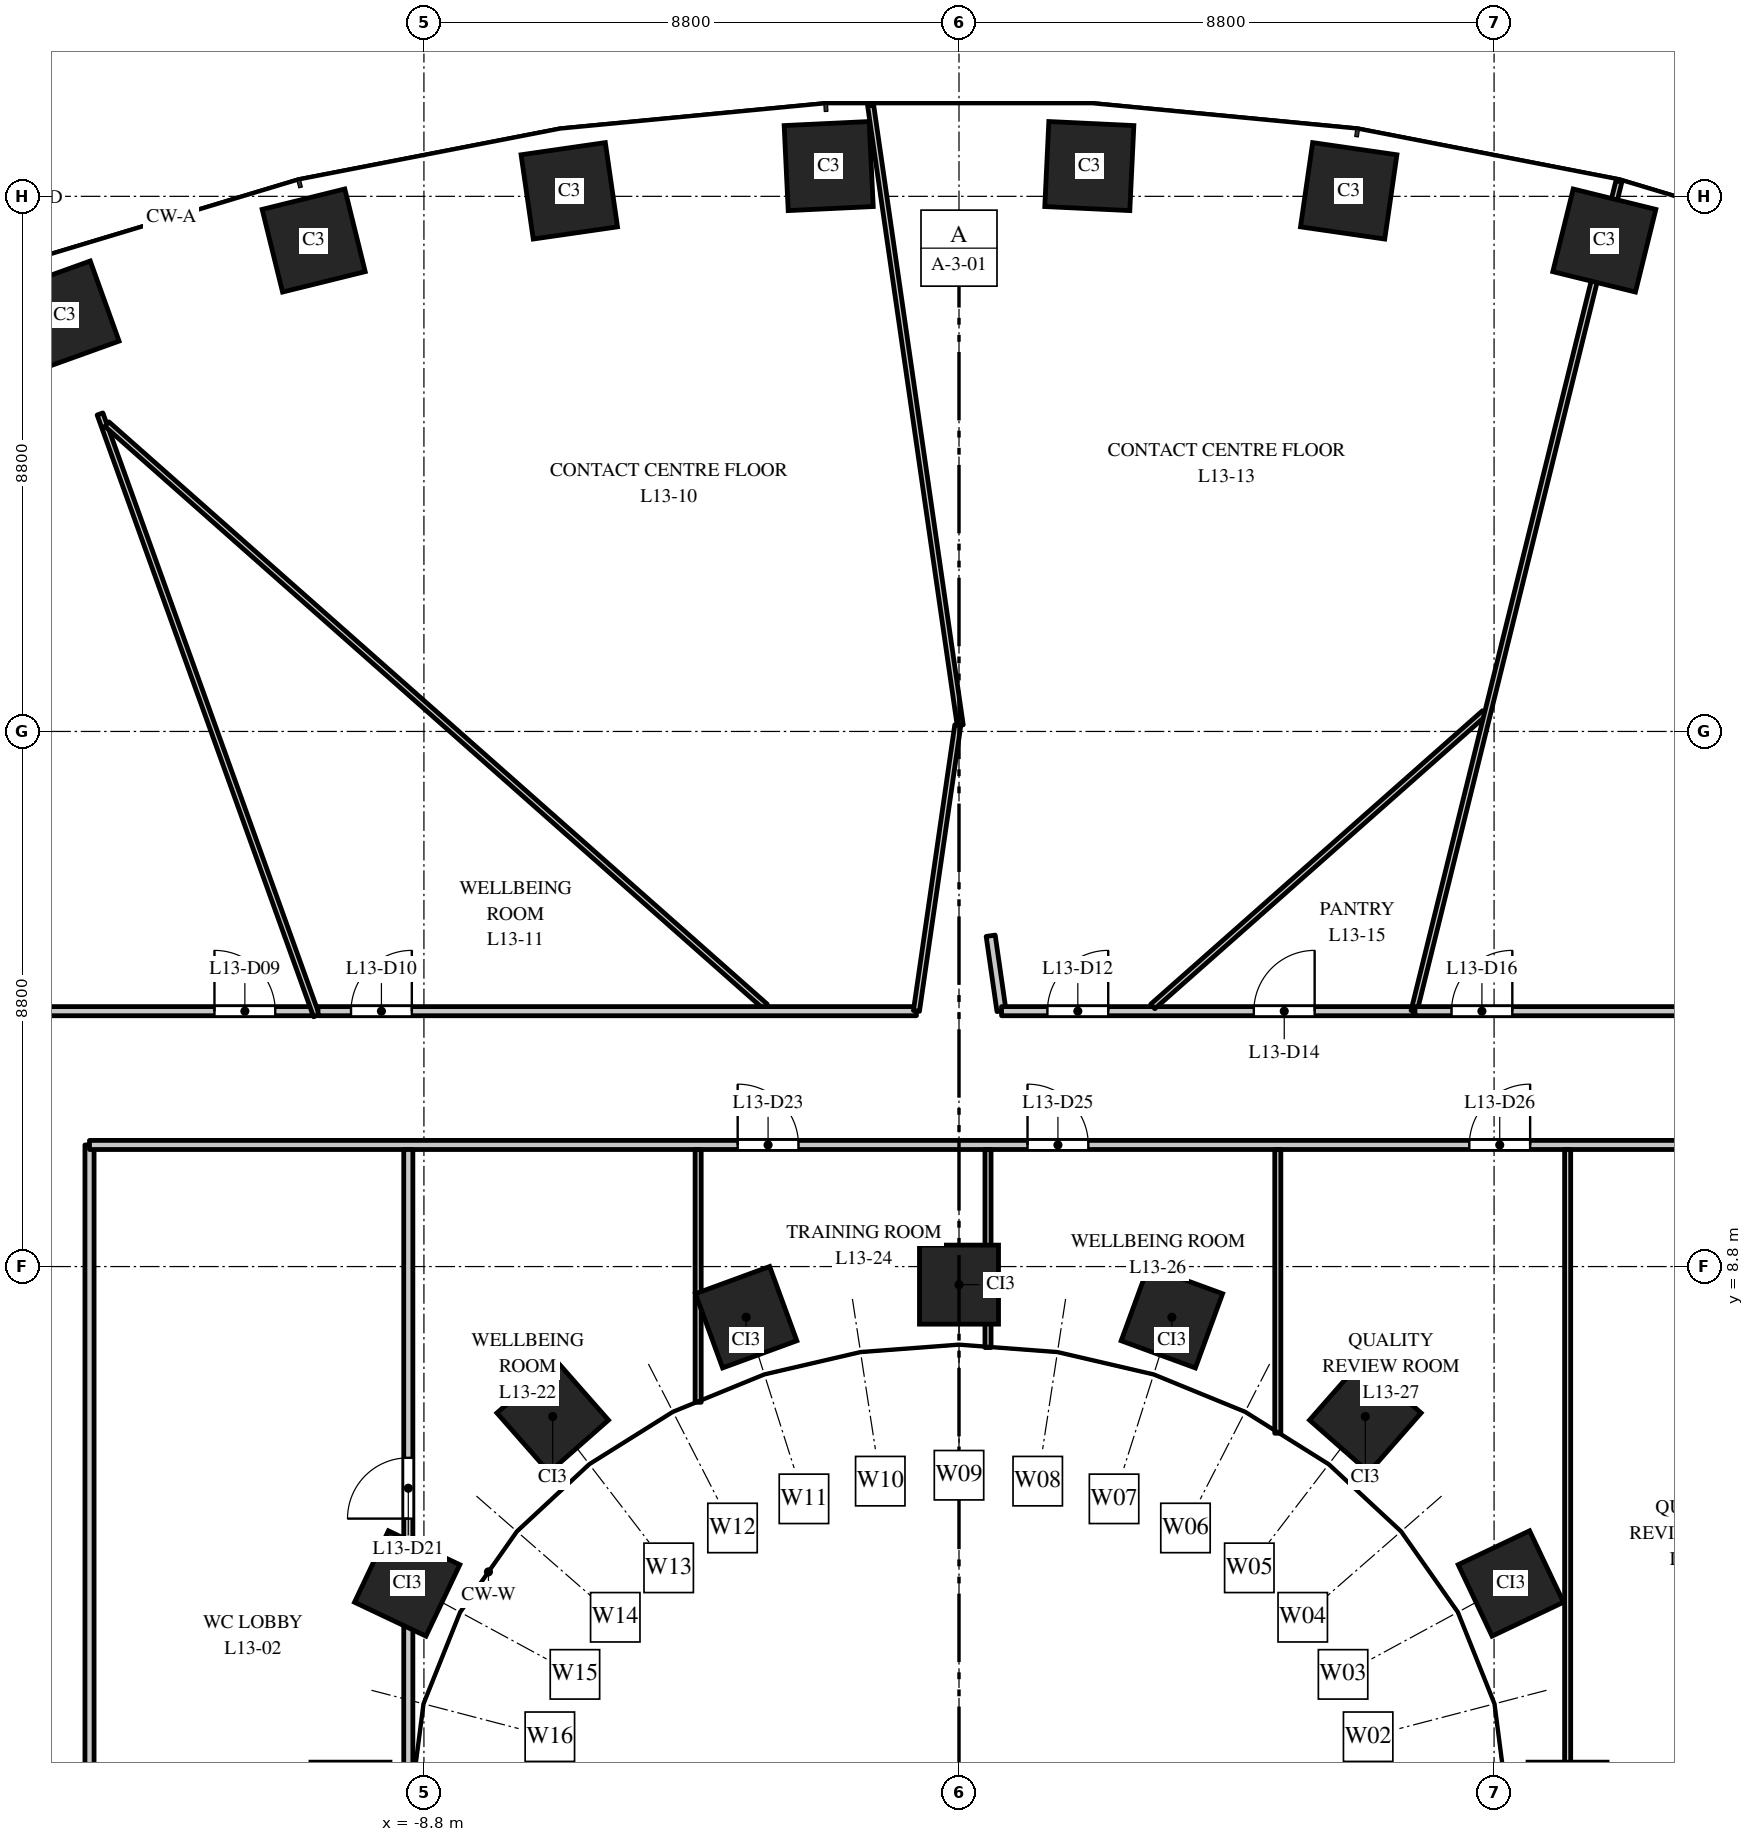
"""IFC4 building model, lengths in metres.
Left out: names, types, materials, properties, quantities, classifications, styles, units other than length and angle.
Written with IfcOpenShell. Run it as: python <this file> out.ifc"""

import sys

from ifc_helpers import new_model, si_unit, direction, frame, frame_2d, origin, origin_2d, place, context, subcontext, project, spatial, rectangle, extrude, element, fill, save


model = new_model("IFC4")
c1 = context("Model", 3, precision=1e-05, world=origin(), true_north=direction((0.0, 1.0)))
c2 = subcontext(c1, "Body", "Model", "MODEL_VIEW")
j1 = project(units=[si_unit("LENGTHUNIT", "METRE"), si_unit("PLANEANGLEUNIT", "RADIAN")], contexts=[c1])
p1 = place(None, origin())
s1 = spatial("IfcSite", under=j1, at=p1, CompositionType="ELEMENT")
p2 = place(p1, origin())
s2 = spatial("IfcBuilding", under=s1, at=p2, CompositionType="ELEMENT")
p3 = place(p2, frame((0.0, 0.0, 62.5)))
s3 = spatial("IfcBuildingStorey", under=s2, at=p3, CompositionType="ELEMENT", Elevation=62.5)
for number, where, z_axis, x_axis in (
    (1, (10.613, 25.674, 0.0), (0.0, 0.0, 1.0), (-0.971, 0.24, 0.0)),
    (2, (6.409, 26.491, 0.0), (0.0, 0.0, 1.0), (-0.99, 0.143, 0.0)),
    (3, (2.143, 26.898, 0.0), (0.0, 0.0, 1.0), (-0.999, 0.048, 0.0)),
    (4, (-2.143, 26.898, 0.0), (0.0, 0.0, 1.0), (-0.999, -0.048, 0.0)),
    (5, (-6.409, 26.491, 0.0), (0.0, 0.0, 1.0), (-0.99, -0.143, 0.0)),
    (6, (-10.613, 25.674, 0.0), (0.0, 0.0, 1.0), (-0.971, -0.24, 0.0)),
    (7, (-14.709, 24.441, 0.0), (0.0, 0.0, 1.0), (-0.941, -0.338, 0.0)),
):
    element("IfcColumn", number, at=place(p3, frame(where, z_axis=z_axis, x_axis=x_axis)), inside=s3, PredefinedType="COLUMN", context=c2, shape_type="SweptSolid", body=[
        extrude(rectangle(XDim=1.4, YDim=1.4, at=origin_2d()), origin(), (0.0, 0.0, 1.0), 4.0),
    ])
for number, where, z_axis, x_axis in (
    (8, (10.008, 0.0, 0.0), (0.0, 0.0, 1.0), (0.0, 1.0, 0.0)),
    (9, (9.076, 3.588, 0.0), (0.0, 0.0, 1.0), (-0.429, 0.903, 0.0)),
    (10, (6.682, 6.334, 0.0), (0.0, 0.0, 1.0), (-0.751, 0.66, 0.0)),
    (11, (3.501, 7.967, 0.0), (0.0, 0.0, 1.0), (-0.939, 0.344, 0.0)),
    (12, (0.0, 8.503, 0.0), (0.0, 0.0, 1.0), (-1.0, 0.0, 0.0)),
    (13, (-3.501, 7.967, 0.0), (0.0, 0.0, 1.0), (-0.939, -0.344, 0.0)),
    (14, (-6.682, 6.334, 0.0), (0.0, 0.0, 1.0), (-0.751, -0.66, 0.0)),
    (15, (-9.076, 3.588, 0.0), (0.0, 0.0, 1.0), (-0.429, -0.903, 0.0)),
    (16, (-10.008, 0.0, 0.0), (0.0, 0.0, 1.0), (0.0, -1.0, 0.0)),
):
    element("IfcColumn", number, at=place(p3, frame(where, z_axis=z_axis, x_axis=x_axis)), inside=s3, PredefinedType="COLUMN", context=c2, shape_type="SweptSolid", body=[
        extrude(rectangle(XDim=1.3, YDim=1.3, at=origin_2d()), origin(), (0.0, 0.0, 1.0), 4.0),
    ])
p4 = place(p3, frame((-16.5, 13.0, 0.0), z_axis=(0.0, 0.0, 1.0), x_axis=(1.0, 0.0, 0.0)))
e17 = element("IfcWall", 17, at=p4, inside=s3, PredefinedType="PARTITIONING", context=c2, shape_type="SweptSolid", body=[
    extrude(rectangle(XDim=5.893, YDim=0.15, at=frame_2d((2.947, 0.0))), origin(), (0.0, 0.0, 1.0), 2.85),
])
p5 = place(p4, frame((4.255, 0.0, 0.0)))
e18 = element("IfcOpeningElement", 18, at=p5, cuts=e17, PredefinedType="OPENING", context=c2, shape_type="SweptSolid", body=[
    extrude(rectangle(XDim=1.0, YDim=2.1, at=frame_2d((0.5, 1.05))), frame((0.0, 0.085, 0.0), z_axis=(0.0, -1.0, 0.0), x_axis=(1.0, 0.0, 0.0)), (0.0, 0.0, 1.0), 0.17),
])
p6 = place(p3, frame((-14.3, -10.8, 0.0), z_axis=(0.0, 0.0, 1.0), x_axis=(0.0, 1.0, 0.0)))
e19 = element("IfcWall", 19, at=p6, inside=s3, PredefinedType="PARTITIONING", context=c2, shape_type="SweptSolid", body=[
    extrude(rectangle(XDim=21.6, YDim=0.15, at=frame_2d((10.8, 0.0))), origin(), (0.0, 0.0, 1.0), 2.75),
])
p7 = place(p6, frame((0.65, 0.0, 0.0)))
e20 = element("IfcOpeningElement", 20, at=p7, cuts=e19, PredefinedType="OPENING", context=c2, shape_type="SweptSolid", body=[
    extrude(rectangle(XDim=1.0, YDim=2.1, at=frame_2d((0.5, 1.05))), frame((0.0, 0.085, 0.0), z_axis=(0.0, -1.0, 0.0), x_axis=(1.0, 0.0, 0.0)), (0.0, 0.0, 1.0), 0.17),
])
p8 = place(p3, frame((-14.3, 10.8, 0.0), z_axis=(0.0, 0.0, 1.0), x_axis=(1.0, 0.0, 0.0)))
e21 = element("IfcWall", 21, at=p8, inside=s3, PredefinedType="PARTITIONING", context=c2, shape_type="SweptSolid", body=[
    extrude(rectangle(XDim=28.6, YDim=0.15, at=frame_2d((14.3, 0.0))), origin(), (0.0, 0.0, 1.0), 2.85),
])
p9 = place(p8, frame((10.66, 0.0, 0.0)))
e22 = element("IfcOpeningElement", 22, at=p9, cuts=e21, PredefinedType="OPENING", context=c2, shape_type="SweptSolid", body=[
    extrude(rectangle(XDim=1.0, YDim=2.1, at=frame_2d((0.5, 1.05))), frame((0.0, 0.085, 0.0), z_axis=(0.0, -1.0, 0.0), x_axis=(1.0, 0.0, 0.0)), (0.0, 0.0, 1.0), 0.17),
])
p10 = place(p8, frame((15.427, 0.0, 0.0)))
e23 = element("IfcOpeningElement", 23, at=p10, cuts=e21, PredefinedType="OPENING", context=c2, shape_type="SweptSolid", body=[
    extrude(rectangle(XDim=1.0, YDim=2.1, at=frame_2d((0.5, 1.05))), frame((0.0, 0.085, 0.0), z_axis=(0.0, -1.0, 0.0), x_axis=(1.0, 0.0, 0.0)), (0.0, 0.0, 1.0), 0.17),
])
p11 = place(p8, frame((22.693, 0.0, 0.0)))
e24 = element("IfcOpeningElement", 24, at=p11, cuts=e21, PredefinedType="OPENING", context=c2, shape_type="SweptSolid", body=[
    extrude(rectangle(XDim=1.0, YDim=2.1, at=frame_2d((0.5, 1.05))), frame((0.0, 0.085, 0.0), z_axis=(0.0, -1.0, 0.0), x_axis=(1.0, 0.0, 0.0)), (0.0, 0.0, 1.0), 0.17),
])
p12 = place(p3, frame((-14.127, 22.821, 0.0), z_axis=(0.0, 0.0, 1.0), x_axis=(0.338406243201, -0.941000114008, 0.0)))
e25 = element("IfcWall", 25, at=p12, inside=s3, PredefinedType="PARTITIONING", context=c2, shape_type="SweptSolid", body=[
    extrude(rectangle(XDim=10.516, YDim=0.1, at=frame_2d((5.258, 0.0))), origin(), (0.0, 0.0, 1.0), 2.85),
])
p13 = place(p3, frame((-14.014, 22.654, 0.0), z_axis=(0.0, 0.0, 1.0), x_axis=(0.749047176019, -0.662516662506, 0.0)))
e26 = element("IfcWall", 26, at=p13, inside=s3, PredefinedType="PARTITIONING", context=c2, shape_type="SweptSolid", body=[
    extrude(rectangle(XDim=14.454, YDim=0.1, at=frame_2d((7.227, 0.0))), origin(), (0.0, 0.0, 1.0), 2.85),
])
p14 = place(p3, frame((-10.542, 13.0, 0.0), z_axis=(0.0, 0.0, 1.0), x_axis=(1.0, 0.0, 0.0)))
e27 = element("IfcWall", 27, at=p14, inside=s3, PredefinedType="PARTITIONING", context=c2, shape_type="SweptSolid", body=[
    extrude(rectangle(XDim=9.842, YDim=0.15, at=frame_2d((4.921, 0.0))), origin(), (0.0, 0.0, 1.0), 2.85),
])
p15 = place(p14, frame((0.543, 0.0, 0.0)))
e28 = element("IfcOpeningElement", 28, at=p15, cuts=e27, PredefinedType="OPENING", context=c2, shape_type="SweptSolid", body=[
    extrude(rectangle(XDim=1.0, YDim=2.1, at=frame_2d((0.5, 1.05))), frame((0.0, 0.085, 0.0), z_axis=(0.0, -1.0, 0.0), x_axis=(1.0, 0.0, 0.0)), (0.0, 0.0, 1.0), 0.17),
])
p16 = place(p3, frame((-9.057, 0.045, 0.0), z_axis=(0.0, 0.0, 1.0), x_axis=(0.0, 1.0, 0.0)))
e29 = element("IfcWall", 29, at=p16, inside=s3, PredefinedType="PARTITIONING", context=c2, shape_type="SweptSolid", body=[
    extrude(rectangle(XDim=10.68, YDim=0.15, at=frame_2d((5.34, 0.0))), origin(), (0.0, 0.0, 1.0), 2.75),
])
p17 = place(p16, frame((4.61, 0.0, 0.0)))
e30 = element("IfcOpeningElement", 30, at=p17, cuts=e29, PredefinedType="OPENING", context=c2, shape_type="SweptSolid", body=[
    extrude(rectangle(XDim=1.0, YDim=2.1, at=frame_2d((0.5, 1.05))), frame((0.0, 0.085, 0.0), z_axis=(0.0, -1.0, 0.0), x_axis=(1.0, 0.0, 0.0)), (0.0, 0.0, 1.0), 0.17),
])
p18 = place(p3, frame((-4.29, 6.568, 0.0), z_axis=(0.0, 0.0, 1.0), x_axis=(0.0, 1.0, 0.0)))
e31 = element("IfcWall", 31, at=p18, inside=s3, PredefinedType="PARTITIONING", context=c2, shape_type="SweptSolid", body=[
    extrude(rectangle(XDim=4.157, YDim=0.1, at=frame_2d((2.079, 0.0))), origin(), (0.0, 0.0, 1.0), 2.85),
])
p19 = place(p3, frame((-1.453, 27.894, 0.0), z_axis=(0.0, 0.0, 1.0), x_axis=(0.143027592995, -0.989718701269, 0.0)))
e32 = element("IfcWall", 32, at=p19, inside=s3, PredefinedType="PARTITIONING", context=c2, shape_type="SweptSolid", body=[
    extrude(rectangle(XDim=10.298, YDim=0.1, at=frame_2d((5.149, 0.0))), origin(), (0.0, 0.0, 1.0), 2.85),
])
p20 = place(p3, frame((-0.7, 13.004, 0.0), z_axis=(0.0, 0.0, 1.0), x_axis=(0.143235607816, 0.989688618028, 0.0)))
e33 = element("IfcWall", 33, at=p20, inside=s3, PredefinedType="PARTITIONING", context=c2, shape_type="SweptSolid", body=[
    extrude(rectangle(XDim=4.747, YDim=0.1, at=frame_2d((2.374, 0.0))), origin(), (0.0, 0.0, 1.0), 3.7),
])
p21 = place(p3, frame((0.477, 7.468, 0.0), z_axis=(0.0, 0.0, 1.0), x_axis=(0.0, 1.0, 0.0)))
e34 = element("IfcWall", 34, at=p21, inside=s3, PredefinedType="PARTITIONING", context=c2, shape_type="SweptSolid", body=[
    extrude(rectangle(XDim=3.257, YDim=0.1, at=frame_2d((1.628, 0.0))), origin(), (0.0, 0.0, 1.0), 2.85),
])
p22 = place(p3, frame((0.521, 14.24, 0.0), z_axis=(0.0, 0.0, 1.0), x_axis=(0.142516043205, -0.989792492106, 0.0)))
e35 = element("IfcWall", 35, at=p22, inside=s3, PredefinedType="PARTITIONING", context=c2, shape_type="SweptSolid", body=[
    extrude(rectangle(XDim=1.249, YDim=0.15, at=frame_2d((0.625, 0.0))), origin(), (0.0, 0.0, 1.0), 3.7),
])
p23 = place(p3, frame((0.7, 13.0, 0.0), z_axis=(0.0, 0.0, 1.0), x_axis=(1.0, 0.0, 0.0)))
e36 = element("IfcWall", 36, at=p23, inside=s3, PredefinedType="PARTITIONING", context=c2, shape_type="SweptSolid", body=[
    extrude(rectangle(XDim=6.783, YDim=0.15, at=frame_2d((3.392, 0.0))), origin(), (0.0, 0.0, 1.0), 2.85),
])
p24 = place(p23, frame((0.754, 0.0, 0.0)))
e37 = element("IfcOpeningElement", 37, at=p24, cuts=e36, PredefinedType="OPENING", context=c2, shape_type="SweptSolid", body=[
    extrude(rectangle(XDim=1.0, YDim=2.1, at=frame_2d((0.5, 1.05))), frame((0.0, 0.085, 0.0), z_axis=(0.0, -1.0, 0.0), x_axis=(1.0, 0.0, 0.0)), (0.0, 0.0, 1.0), 0.17),
])
p25 = place(p23, frame((4.149, 0.0, 0.0)))
e38 = element("IfcOpeningElement", 38, at=p25, cuts=e36, PredefinedType="OPENING", context=c2, shape_type="SweptSolid", body=[
    extrude(rectangle(XDim=1.0, YDim=2.1, at=frame_2d((0.5, 1.05))), frame((0.0, 0.085, 0.0), z_axis=(0.0, -1.0, 0.0), x_axis=(1.0, 0.0, 0.0)), (0.0, 0.0, 1.0), 0.17),
])
p26 = place(p3, frame((3.187, 13.078, 0.0), z_axis=(0.0, 0.0, 1.0), x_axis=(0.749027274438, 0.662539162728, 0.0)))
e39 = element("IfcWall", 39, at=p26, inside=s3, PredefinedType="PARTITIONING", context=c2, shape_type="SweptSolid", body=[
    extrude(rectangle(XDim=7.283, YDim=0.1, at=frame_2d((3.642, 0.0))), origin(), (0.0, 0.0, 1.0), 2.85),
])
p27 = place(p3, frame((5.243, 6.059, 0.0), z_axis=(0.0, 0.0, 1.0), x_axis=(0.0, 1.0, 0.0)))
e40 = element("IfcWall", 40, at=p27, inside=s3, PredefinedType="PARTITIONING", context=c2, shape_type="SweptSolid", body=[
    extrude(rectangle(XDim=4.666, YDim=0.1, at=frame_2d((2.333, 0.0))), origin(), (0.0, 0.0, 1.0), 2.85),
])
p28 = place(p3, frame((7.483, 13.0, 0.0), z_axis=(0.0, 0.0, 1.0), x_axis=(0.239763745499, 0.97083126564, 0.0)))
e41 = element("IfcWall", 41, at=p28, inside=s3, PredefinedType="PARTITIONING", context=c2, shape_type="SweptSolid", body=[
    extrude(rectangle(XDim=14.056, YDim=0.1, at=frame_2d((7.028, 0.0))), origin(), (0.0, 0.0, 1.0), 2.85),
])
p29 = place(p3, frame((7.499, 13.0, 0.0), z_axis=(0.0, 0.0, 1.0), x_axis=(1.0, 0.0, 0.0)))
e42 = element("IfcWall", 42, at=p29, inside=s3, PredefinedType="PARTITIONING", context=c2, shape_type="SweptSolid", body=[
    extrude(rectangle(XDim=9.001, YDim=0.15, at=frame_2d((4.5, 0.0))), origin(), (0.0, 0.0, 1.0), 2.85),
])
p30 = place(p29, frame((0.601, 0.0, 0.0)))
e43 = element("IfcOpeningElement", 43, at=p30, cuts=e42, PredefinedType="OPENING", context=c2, shape_type="SweptSolid", body=[
    extrude(rectangle(XDim=1.0, YDim=2.1, at=frame_2d((0.5, 1.05))), frame((0.0, 0.085, 0.0), z_axis=(0.0, -1.0, 0.0), x_axis=(1.0, 0.0, 0.0)), (0.0, 0.0, 1.0), 0.17),
])
p31 = place(p3, frame((10.01, -10.725, 0.0), z_axis=(0.0, 0.0, 1.0), x_axis=(0.0, 1.0, 0.0)))
e44 = element("IfcWall", 44, at=p31, inside=s3, PredefinedType="PARTITIONING", context=c2, shape_type="SweptSolid", body=[
    extrude(rectangle(XDim=21.45, YDim=0.1, at=frame_2d((10.725, 0.0))), origin(), (0.0, 0.0, 1.0), 2.75),
])
p32 = place(p5, origin())
e45 = element("IfcDoor", 45, at=p32, inside=s3, OperationType="SINGLE_SWING_LEFT", PredefinedType="DOOR", context=c2, shape_type="SweptSolid", body=[
    extrude(rectangle(XDim=1.0, YDim=2.1, at=frame_2d((0.5, 1.05))), frame((0.0, 0.025, 0.0), z_axis=(0.0, -1.0, 0.0), x_axis=(1.0, 0.0, 0.0)), (0.0, 0.0, 1.0), 0.05),
])
fill(e18, e45)
p33 = place(p15, origin())
e46 = element("IfcDoor", 46, at=p33, inside=s3, OperationType="SINGLE_SWING_RIGHT", PredefinedType="DOOR", context=c2, shape_type="SweptSolid", body=[
    extrude(rectangle(XDim=1.0, YDim=2.1, at=frame_2d((0.5, 1.05))), frame((0.0, 0.025, 0.0), z_axis=(0.0, -1.0, 0.0), x_axis=(1.0, 0.0, 0.0)), (0.0, 0.0, 1.0), 0.05),
])
fill(e28, e46)
p34 = place(p24, origin())
e47 = element("IfcDoor", 47, at=p34, inside=s3, OperationType="SINGLE_SWING_RIGHT", PredefinedType="DOOR", context=c2, shape_type="SweptSolid", body=[
    extrude(rectangle(XDim=1.0, YDim=2.1, at=frame_2d((0.5, 1.05))), frame((0.0, 0.025, 0.0), z_axis=(0.0, -1.0, 0.0), x_axis=(1.0, 0.0, 0.0)), (0.0, 0.0, 1.0), 0.05),
])
fill(e37, e47)
p35 = place(p25, origin())
e48 = element("IfcDoor", 48, at=p35, inside=s3, OperationType="SINGLE_SWING_RIGHT", PredefinedType="DOOR", context=c2, shape_type="SweptSolid", body=[
    extrude(rectangle(XDim=1.0, YDim=2.1, at=frame_2d((0.5, 1.05))), frame((0.0, 0.025, 0.0), z_axis=(0.0, -1.0, 0.0), x_axis=(1.0, 0.0, 0.0)), (0.0, 0.0, 1.0), 0.05),
])
fill(e38, e48)
p36 = place(p30, origin())
e49 = element("IfcDoor", 49, at=p36, inside=s3, OperationType="SINGLE_SWING_RIGHT", PredefinedType="DOOR", context=c2, shape_type="SweptSolid", body=[
    extrude(rectangle(XDim=1.0, YDim=2.1, at=frame_2d((0.5, 1.05))), frame((0.0, 0.025, 0.0), z_axis=(0.0, -1.0, 0.0), x_axis=(1.0, 0.0, 0.0)), (0.0, 0.0, 1.0), 0.05),
])
fill(e43, e49)
p37 = place(p17, origin())
e50 = element("IfcDoor", 50, at=p37, inside=s3, OperationType="SINGLE_SWING_LEFT", PredefinedType="DOOR", context=c2, shape_type="SweptSolid", body=[
    extrude(rectangle(XDim=1.0, YDim=2.1, at=frame_2d((0.5, 1.05))), frame((0.0, 0.025, 0.0), z_axis=(0.0, -1.0, 0.0), x_axis=(1.0, 0.0, 0.0)), (0.0, 0.0, 1.0), 0.05),
])
fill(e30, e50)
p38 = place(p9, origin())
e51 = element("IfcDoor", 51, at=p38, inside=s3, OperationType="SINGLE_SWING_LEFT", PredefinedType="DOOR", context=c2, shape_type="SweptSolid", body=[
    extrude(rectangle(XDim=1.0, YDim=2.1, at=frame_2d((0.5, 1.05))), frame((0.0, 0.025, 0.0), z_axis=(0.0, -1.0, 0.0), x_axis=(1.0, 0.0, 0.0)), (0.0, 0.0, 1.0), 0.05),
])
fill(e22, e51)
p39 = place(p10, origin())
e52 = element("IfcDoor", 52, at=p39, inside=s3, OperationType="SINGLE_SWING_LEFT", PredefinedType="DOOR", context=c2, shape_type="SweptSolid", body=[
    extrude(rectangle(XDim=1.0, YDim=2.1, at=frame_2d((0.5, 1.05))), frame((0.0, 0.025, 0.0), z_axis=(0.0, -1.0, 0.0), x_axis=(1.0, 0.0, 0.0)), (0.0, 0.0, 1.0), 0.05),
])
fill(e23, e52)
p40 = place(p11, origin())
e53 = element("IfcDoor", 53, at=p40, inside=s3, OperationType="SINGLE_SWING_RIGHT", PredefinedType="DOOR", context=c2, shape_type="SweptSolid", body=[
    extrude(rectangle(XDim=1.0, YDim=2.1, at=frame_2d((0.5, 1.05))), frame((0.0, 0.025, 0.0), z_axis=(0.0, -1.0, 0.0), x_axis=(1.0, 0.0, 0.0)), (0.0, 0.0, 1.0), 0.05),
])
fill(e24, e53)
save(model, sys.argv[1])
